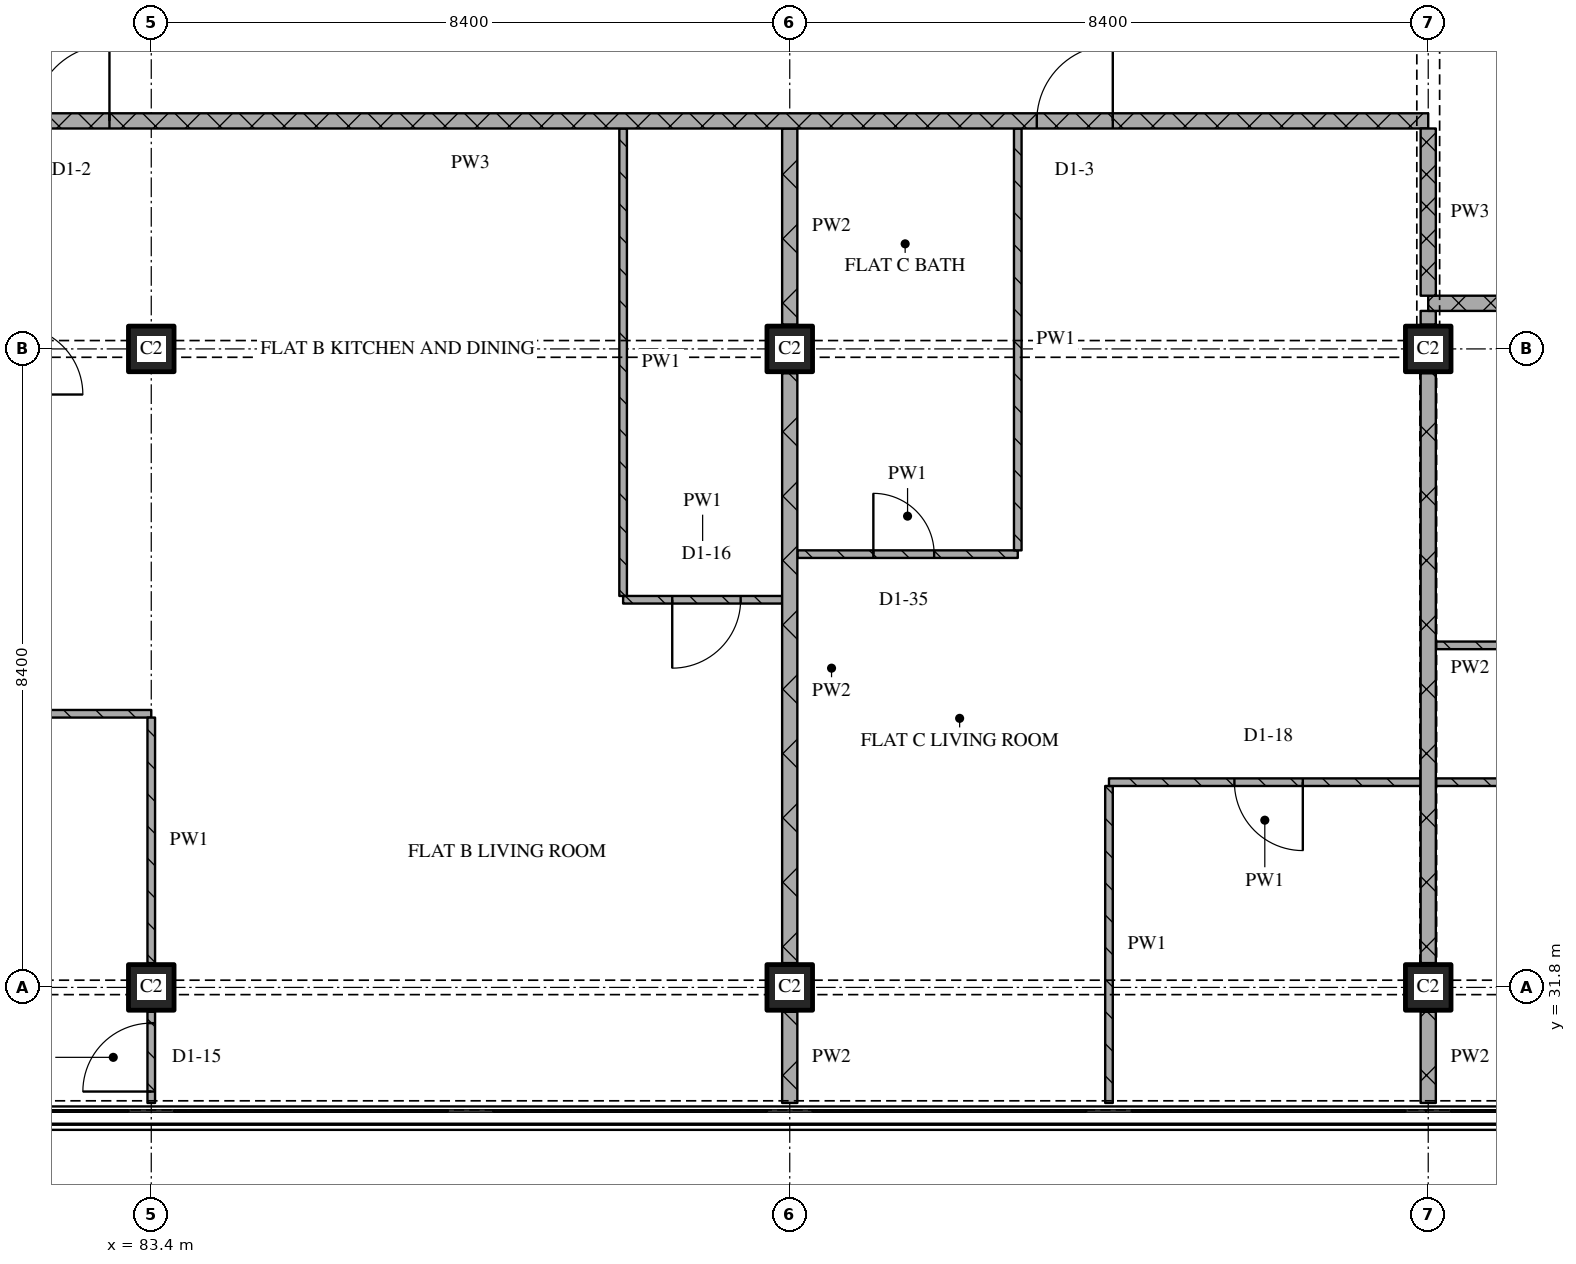
"""IFC4 building model, lengths in metres.
Left out: names, types, materials, properties, quantities, classifications, styles, units other than length and angle.
Written with IfcOpenShell. Run it as: python <this file> out.ifc"""

import sys

from ifc_helpers import new_model, si_unit, direction, frame, frame_2d, origin, origin_2d, place, context, subcontext, project, spatial, rectangle, extrude, element, fill, save


model = new_model("IFC4")
c1 = context("Model", 3, precision=1e-05, world=origin(), true_north=direction((0.0, 1.0)))
c2 = subcontext(c1, "Body", "Model", "MODEL_VIEW")
j1 = project(units=[si_unit("LENGTHUNIT", "METRE"), si_unit("PLANEANGLEUNIT", "RADIAN")], contexts=[c1])
p1 = place(None, origin())
s1 = spatial("IfcSite", under=j1, at=p1, CompositionType="ELEMENT")
p2 = place(p1, origin())
s2 = spatial("IfcBuilding", under=s1, at=p2, CompositionType="ELEMENT")
p3 = place(p2, frame((0.0, 0.0, 209.1)))
s3 = spatial("IfcBuildingStorey", under=s2, at=p3, CompositionType="ELEMENT", Elevation=209.1)
for number, where, z_axis, x_axis in (
    (1, (83.4, 31.8, 0.0), (0.0, 0.0, 1.0), (1.0, 0.0, 0.0)),
    (2, (83.4, 40.2, 0.0), (0.0, 0.0, 1.0), (1.0, 0.0, 0.0)),
    (3, (91.8, 31.8, 0.0), (0.0, 0.0, 1.0), (1.0, 0.0, 0.0)),
    (4, (91.8, 40.2, 0.0), (0.0, 0.0, 1.0), (1.0, 0.0, 0.0)),
    (5, (100.2, 31.8, 0.0), (0.0, 0.0, 1.0), (1.0, 0.0, 0.0)),
    (6, (100.2, 40.2, 0.0), (0.0, 0.0, 1.0), (1.0, 0.0, 0.0)),
):
    element("IfcColumn", number, at=place(p3, frame(where, z_axis=z_axis, x_axis=x_axis)), inside=s3, PredefinedType="COLUMN", context=c2, shape_type="SweptSolid", body=[
        extrude(rectangle(XDim=0.6, YDim=0.6, at=origin_2d()), origin(), (0.0, 0.0, 1.0), 3.6),
    ])
p4 = place(p3, frame((75.1, 35.4, 0.0), z_axis=(0.0, 0.0, 1.0), x_axis=(1.0, 0.0, 0.0)))
e7 = element("IfcWall", 7, at=p4, inside=s3, PredefinedType="PARTITIONING", context=c2, shape_type="SweptSolid", body=[
    extrude(rectangle(XDim=8.3, YDim=0.1, at=frame_2d((4.15, 0.0))), origin(), (0.0, 0.0, 1.0), 3.32),
])
p5 = place(p3, frame((100.3, 36.3, 0.0), z_axis=(0.0, 0.0, 1.0), x_axis=(1.0, 0.0, 0.0)))
e8 = element("IfcWall", 8, at=p5, inside=s3, PredefinedType="PARTITIONING", context=c2, shape_type="SweptSolid", body=[
    extrude(rectangle(XDim=11.3, YDim=0.1, at=frame_2d((5.65, 0.0))), origin(), (0.0, 0.0, 1.0), 3.32),
])
p6 = place(p5, frame((1.75, 0.0, 0.0)))
e9 = element("IfcOpeningElement", 9, at=p6, cuts=e8, PredefinedType="OPENING", context=c2, shape_type="SweptSolid", body=[
    extrude(rectangle(XDim=0.8, YDim=2.1, at=frame_2d((0.4, 1.05))), frame((0.0, 0.06, 0.0), z_axis=(0.0, -1.0, 0.0), x_axis=(1.0, 0.0, 0.0)), (0.0, 0.0, 1.0), 0.12),
])
p7 = place(p5, frame((6.25, 0.0, 0.0)))
e10 = element("IfcOpeningElement", 10, at=p7, cuts=e8, PredefinedType="OPENING", context=c2, shape_type="SweptSolid", body=[
    extrude(rectangle(XDim=0.8, YDim=2.1, at=frame_2d((0.4, 1.05))), frame((0.0, 0.06, 0.0), z_axis=(0.0, -1.0, 0.0), x_axis=(1.0, 0.0, 0.0)), (0.0, 0.0, 1.0), 0.12),
])
p8 = place(p3, frame((89.608, 36.9, 0.0), z_axis=(0.0, 0.0, 1.0), x_axis=(1.0, 0.0, 0.0)))
e11 = element("IfcWall", 11, at=p8, inside=s3, PredefinedType="PARTITIONING", context=c2, shape_type="SweptSolid", body=[
    extrude(rectangle(XDim=2.092, YDim=0.1, at=frame_2d((1.046, 0.0))), origin(), (0.0, 0.0, 1.0), 3.32),
])
p9 = place(p8, frame((0.646, 0.0, 0.0)))
e12 = element("IfcOpeningElement", 12, at=p9, cuts=e11, PredefinedType="OPENING", context=c2, shape_type="SweptSolid", body=[
    extrude(rectangle(XDim=0.9, YDim=2.1, at=frame_2d((0.45, 1.05))), frame((0.0, 0.06, 0.0), z_axis=(0.0, -1.0, 0.0), x_axis=(1.0, 0.0, 0.0)), (0.0, 0.0, 1.0), 0.12),
])
p10 = place(p3, frame((91.9, 37.5, 0.0), z_axis=(0.0, 0.0, 1.0), x_axis=(1.0, 0.0, 0.0)))
e13 = element("IfcWall", 13, at=p10, inside=s3, PredefinedType="PARTITIONING", context=c2, shape_type="SweptSolid", body=[
    extrude(rectangle(XDim=2.9, YDim=0.1, at=frame_2d((1.45, 0.0))), origin(), (0.0, 0.0, 1.0), 3.32),
])
p11 = place(p10, frame((1.0, 0.0, 0.0)))
e14 = element("IfcOpeningElement", 14, at=p11, cuts=e13, PredefinedType="OPENING", context=c2, shape_type="SweptSolid", body=[
    extrude(rectangle(XDim=0.8, YDim=2.1, at=frame_2d((0.4, 1.05))), frame((0.0, 0.06, 0.0), z_axis=(0.0, -1.0, 0.0), x_axis=(1.0, 0.0, 0.0)), (0.0, 0.0, 1.0), 0.12),
])
p12 = place(p3, frame((124.58, 40.8, 0.0), z_axis=(0.0, 0.0, 1.0), x_axis=(-1.0, 0.0, 0.0)))
e15 = element("IfcWall", 15, at=p12, inside=s3, PredefinedType="PARTITIONING", context=c2, shape_type="SweptSolid", body=[
    extrude(rectangle(XDim=24.38, YDim=0.2, at=frame_2d((12.19, 0.0))), origin(), (0.0, 0.0, 1.0), 3.32),
])
p13 = place(p12, frame((11.73, 0.0, 0.0)))
e16 = element("IfcOpeningElement", 16, at=p13, cuts=e15, PredefinedType="OPENING", context=c2, shape_type="SweptSolid", body=[
    extrude(rectangle(XDim=1.0, YDim=2.1, at=frame_2d((0.5, 1.05))), frame((0.0, 0.11, 0.0), z_axis=(0.0, -1.0, 0.0), x_axis=(1.0, 0.0, 0.0)), (0.0, 0.0, 1.0), 0.22),
])
p14 = place(p3, frame((100.2, 43.2, 0.0), z_axis=(0.0, 0.0, 1.0), x_axis=(-1.0, 0.0, 0.0)))
e17 = element("IfcWall", 17, at=p14, inside=s3, PredefinedType="PARTITIONING", context=c2, shape_type="SweptSolid", body=[
    extrude(rectangle(XDim=25.2, YDim=0.2, at=frame_2d((12.6, 0.0))), origin(), (0.0, 0.0, 1.0), 3.32),
])
p15 = place(p14, frame((4.15, 0.0, 0.0)))
e18 = element("IfcOpeningElement", 18, at=p15, cuts=e17, PredefinedType="OPENING", context=c2, shape_type="SweptSolid", body=[
    extrude(rectangle(XDim=1.0, YDim=2.1, at=frame_2d((0.5, 1.05))), frame((0.0, 0.11, 0.0), z_axis=(0.0, -1.0, 0.0), x_axis=(1.0, 0.0, 0.0)), (0.0, 0.0, 1.0), 0.22),
])
p16 = place(p14, frame((17.35, 0.0, 0.0)))
e19 = element("IfcOpeningElement", 19, at=p16, cuts=e17, PredefinedType="OPENING", context=c2, shape_type="SweptSolid", body=[
    extrude(rectangle(XDim=1.0, YDim=2.1, at=frame_2d((0.5, 1.05))), frame((0.0, 0.11, 0.0), z_axis=(0.0, -1.0, 0.0), x_axis=(1.0, 0.0, 0.0)), (0.0, 0.0, 1.0), 0.22),
])
p17 = place(p3, frame((83.4, 30.28, 0.0), z_axis=(0.0, 0.0, 1.0), x_axis=(0.0, 1.0, 0.0)))
e20 = element("IfcWall", 20, at=p17, inside=s3, PredefinedType="PARTITIONING", context=c2, shape_type="SweptSolid", body=[
    extrude(rectangle(XDim=1.2, YDim=0.1, at=frame_2d((0.6, 0.0))), origin(), (0.0, 0.0, 1.0), 3.32),
])
p18 = place(p17, frame((0.15, 0.0, 0.0)))
e21 = element("IfcOpeningElement", 21, at=p18, cuts=e20, PredefinedType="OPENING", context=c2, shape_type="SweptSolid", body=[
    extrude(rectangle(XDim=0.9, YDim=2.1, at=frame_2d((0.45, 1.05))), frame((0.0, 0.06, 0.0), z_axis=(0.0, -1.0, 0.0), x_axis=(1.0, 0.0, 0.0)), (0.0, 0.0, 1.0), 0.12),
])
p19 = place(p3, frame((83.4, 35.35, 0.0), z_axis=(0.0, 0.0, 1.0), x_axis=(0.0, -1.0, 0.0)))
e22 = element("IfcWall", 22, at=p19, inside=s3, PredefinedType="PARTITIONING", context=c2, shape_type="SweptSolid", body=[
    extrude(rectangle(XDim=3.23, YDim=0.1, at=frame_2d((1.615, 0.0))), origin(), (0.0, 0.0, 1.0), 3.32),
])
p20 = place(p3, frame((89.608, 43.1, 0.0), z_axis=(0.0, 0.0, 1.0), x_axis=(0.0, -1.0, 0.0)))
e23 = element("IfcWall", 23, at=p20, inside=s3, PredefinedType="PARTITIONING", context=c2, shape_type="SweptSolid", body=[
    extrude(rectangle(XDim=6.15, YDim=0.1, at=frame_2d((3.075, 0.0))), origin(), (0.0, 0.0, 1.0), 3.32),
])
p21 = place(p3, frame((91.8, 31.48, 0.0), z_axis=(0.0, 0.0, 1.0), x_axis=(0.0, -1.0, 0.0)))
e24 = element("IfcWall", 24, at=p21, inside=s3, PredefinedType="PARTITIONING", context=c2, shape_type="SweptSolid", body=[
    extrude(rectangle(XDim=1.2, YDim=0.2, at=frame_2d((0.6, 0.0))), origin(), (0.0, 0.0, 1.0), 3.32),
])
p22 = place(p3, frame((91.8, 39.88, 0.0), z_axis=(0.0, 0.0, 1.0), x_axis=(0.0, -1.0, 0.0)))
e25 = element("IfcWall", 25, at=p22, inside=s3, PredefinedType="PARTITIONING", context=c2, shape_type="SweptSolid", body=[
    extrude(rectangle(XDim=7.76, YDim=0.2, at=frame_2d((3.88, 0.0))), origin(), (0.0, 0.0, 1.0), 3.32),
])
p23 = place(p3, frame((91.8, 43.1, 0.0), z_axis=(0.0, 0.0, 1.0), x_axis=(0.0, -1.0, 0.0)))
e26 = element("IfcWall", 26, at=p23, inside=s3, PredefinedType="PARTITIONING", context=c2, shape_type="SweptSolid", body=[
    extrude(rectangle(XDim=2.58, YDim=0.2, at=frame_2d((1.29, 0.0))), origin(), (0.0, 0.0, 1.0), 3.32),
])
p24 = place(p3, frame((94.8, 43.1, 0.0), z_axis=(0.0, 0.0, 1.0), x_axis=(0.0, -1.0, 0.0)))
e27 = element("IfcWall", 27, at=p24, inside=s3, PredefinedType="PARTITIONING", context=c2, shape_type="SweptSolid", body=[
    extrude(rectangle(XDim=5.55, YDim=0.1, at=frame_2d((2.775, 0.0))), origin(), (0.0, 0.0, 1.0), 3.32),
])
p25 = place(p3, frame((96.0, 34.45, 0.0), z_axis=(0.0, 0.0, 1.0), x_axis=(0.0, -1.0, 0.0)))
e28 = element("IfcWall", 28, at=p25, inside=s3, PredefinedType="PARTITIONING", context=c2, shape_type="SweptSolid", body=[
    extrude(rectangle(XDim=4.17, YDim=0.1, at=frame_2d((2.085, 0.0))), origin(), (0.0, 0.0, 1.0), 3.32),
])
p26 = place(p3, frame((100.2, 43.1, 0.0), z_axis=(0.0, 0.0, 1.0), x_axis=(0.0, -1.0, 0.0)))
e29 = element("IfcWall", 29, at=p26, inside=s3, PredefinedType="PARTITIONING", context=c2, shape_type="SweptSolid", body=[
    extrude(rectangle(XDim=2.2, YDim=0.2, at=frame_2d((1.1, 0.0))), origin(), (0.0, 0.0, 1.0), 2.53),
])
p27 = place(p3, frame((100.2, 31.48, 0.0), z_axis=(0.0, 0.0, 1.0), x_axis=(0.0, -1.0, 0.0)))
e30 = element("IfcWall", 30, at=p27, inside=s3, PredefinedType="PARTITIONING", context=c2, shape_type="SweptSolid", body=[
    extrude(rectangle(XDim=1.2, YDim=0.2, at=frame_2d((0.6, 0.0))), origin(), (0.0, 0.0, 1.0), 3.32),
])
p28 = place(p3, frame((100.2, 39.88, 0.0), z_axis=(0.0, 0.0, 1.0), x_axis=(0.0, -1.0, 0.0)))
e31 = element("IfcWall", 31, at=p28, inside=s3, PredefinedType="PARTITIONING", context=c2, shape_type="SweptSolid", body=[
    extrude(rectangle(XDim=7.76, YDim=0.2, at=frame_2d((3.88, 0.0))), origin(), (0.0, 0.0, 1.0), 2.72),
])
p29 = place(p3, frame((100.2, 40.7, 0.0), z_axis=(0.0, 0.0, 1.0), x_axis=(0.0, -1.0, 0.0)))
e32 = element("IfcWall", 32, at=p29, inside=s3, PredefinedType="PARTITIONING", context=c2, shape_type="SweptSolid", body=[
    extrude(rectangle(XDim=0.18, YDim=0.2, at=frame_2d((0.09, 0.0))), origin(), (0.0, 0.0, 1.0), 3.32),
])
p30 = place(p3, frame((100.1, 34.5, 0.0), z_axis=(0.0, 0.0, 1.0), x_axis=(-1.0, 0.0, 0.0)))
e33 = element("IfcWall", 33, at=p30, inside=s3, PredefinedType="PARTITIONING", context=c2, shape_type="SweptSolid", body=[
    extrude(rectangle(XDim=4.1, YDim=0.1, at=frame_2d((2.05, 0.0))), origin(), (0.0, 0.0, 1.0), 3.32),
])
p31 = place(p30, frame((1.55, 0.0, 0.0)))
e34 = element("IfcOpeningElement", 34, at=p31, cuts=e33, PredefinedType="OPENING", context=c2, shape_type="SweptSolid", body=[
    extrude(rectangle(XDim=0.9, YDim=2.1, at=frame_2d((0.45, 1.05))), frame((0.0, 0.06, 0.0), z_axis=(0.0, -1.0, 0.0), x_axis=(1.0, 0.0, 0.0)), (0.0, 0.0, 1.0), 0.12),
])
p32 = place(p3, frame((117.0, 34.5, 0.0), z_axis=(0.0, 0.0, 1.0), x_axis=(-1.0, 0.0, 0.0)))
e35 = element("IfcWall", 35, at=p32, inside=s3, PredefinedType="PARTITIONING", context=c2, shape_type="SweptSolid", body=[
    extrude(rectangle(XDim=16.7, YDim=0.1, at=frame_2d((8.35, 0.0))), origin(), (0.0, 0.0, 1.0), 3.32),
])
p33 = place(p32, frame((12.15, 0.0, 0.0)))
e36 = element("IfcOpeningElement", 36, at=p33, cuts=e35, PredefinedType="OPENING", context=c2, shape_type="SweptSolid", body=[
    extrude(rectangle(XDim=0.9, YDim=2.1, at=frame_2d((0.45, 1.05))), frame((0.0, 0.06, 0.0), z_axis=(0.0, -1.0, 0.0), x_axis=(1.0, 0.0, 0.0)), (0.0, 0.0, 1.0), 0.12),
])
p34 = place(p9, origin())
e37 = element("IfcDoor", 37, at=p34, inside=s3, OperationType="SINGLE_SWING_RIGHT", PredefinedType="DOOR", context=c2, shape_type="SweptSolid", body=[
    extrude(rectangle(XDim=0.9, YDim=2.1, at=frame_2d((0.45, 1.05))), frame((0.0, 0.025, 0.0), z_axis=(0.0, -1.0, 0.0), x_axis=(1.0, 0.0, 0.0)), (0.0, 0.0, 1.0), 0.05),
])
fill(e12, e37)
p35 = place(p11, origin())
e38 = element("IfcDoor", 38, at=p35, inside=s3, OperationType="SINGLE_SWING_LEFT", PredefinedType="DOOR", context=c2, shape_type="SweptSolid", body=[
    extrude(rectangle(XDim=0.8, YDim=2.1, at=frame_2d((0.4, 1.05))), frame((0.0, 0.025, 0.0), z_axis=(0.0, -1.0, 0.0), x_axis=(1.0, 0.0, 0.0)), (0.0, 0.0, 1.0), 0.05),
])
fill(e14, e38)
p36 = place(p15, origin())
e39 = element("IfcDoor", 39, at=p36, inside=s3, OperationType="SINGLE_SWING_RIGHT", PredefinedType="DOOR", context=c2, shape_type="SweptSolid", body=[
    extrude(rectangle(XDim=1.0, YDim=2.1, at=frame_2d((0.5, 1.05))), frame((0.0, 0.025, 0.0), z_axis=(0.0, -1.0, 0.0), x_axis=(1.0, 0.0, 0.0)), (0.0, 0.0, 1.0), 0.05),
])
fill(e18, e39)
p37 = place(p16, origin())
e40 = element("IfcDoor", 40, at=p37, inside=s3, OperationType="SINGLE_SWING_RIGHT", PredefinedType="DOOR", context=c2, shape_type="SweptSolid", body=[
    extrude(rectangle(XDim=1.0, YDim=2.1, at=frame_2d((0.5, 1.05))), frame((0.0, 0.025, 0.0), z_axis=(0.0, -1.0, 0.0), x_axis=(1.0, 0.0, 0.0)), (0.0, 0.0, 1.0), 0.05),
])
fill(e19, e40)
p38 = place(p18, origin())
e41 = element("IfcDoor", 41, at=p38, inside=s3, OperationType="SINGLE_SWING_LEFT", PredefinedType="DOOR", context=c2, shape_type="SweptSolid", body=[
    extrude(rectangle(XDim=0.9, YDim=2.1, at=frame_2d((0.45, 1.05))), frame((0.0, 0.025, 0.0), z_axis=(0.0, -1.0, 0.0), x_axis=(1.0, 0.0, 0.0)), (0.0, 0.0, 1.0), 0.05),
])
fill(e21, e41)
p39 = place(p31, origin())
e42 = element("IfcDoor", 42, at=p39, inside=s3, OperationType="SINGLE_SWING_LEFT", PredefinedType="DOOR", context=c2, shape_type="SweptSolid", body=[
    extrude(rectangle(XDim=0.9, YDim=2.1, at=frame_2d((0.45, 1.05))), frame((0.0, 0.025, 0.0), z_axis=(0.0, -1.0, 0.0), x_axis=(1.0, 0.0, 0.0)), (0.0, 0.0, 1.0), 0.05),
])
fill(e34, e42)
save(model, sys.argv[1])
